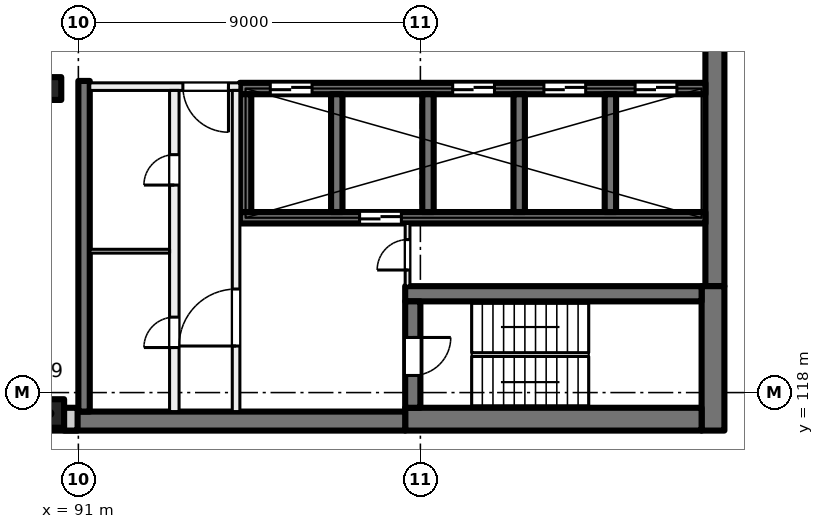
"""IFC4 building model, lengths in metres.
Left out: names, types, materials, properties, quantities, classifications, styles, units other than length and angle.
Written with IfcOpenShell. Run it as: python <this file> out.ifc"""

import sys

from ifc_helpers import new_model, si_unit, direction, frame, frame_2d, origin, origin_2d, place, context, subcontext, project, spatial, rectangle, extrude, element, fill, save


model = new_model("IFC4")
c1 = context("Model", 3, precision=1e-05, world=origin(), true_north=direction((0.0, 1.0)))
c2 = subcontext(c1, "Body", "Model", "MODEL_VIEW")
j1 = project(units=[si_unit("LENGTHUNIT", "METRE"), si_unit("PLANEANGLEUNIT", "RADIAN")], contexts=[c1])
p1 = place(None, origin())
s1 = spatial("IfcSite", under=j1, at=p1, CompositionType="ELEMENT")
p2 = place(p1, origin())
s2 = spatial("IfcBuilding", under=s1, at=p2, CompositionType="ELEMENT")
p3 = place(p2, frame((0.0, 0.0, 224.0)))
s3 = spatial("IfcBuildingStorey", under=s2, at=p3, CompositionType="ELEMENT", Elevation=224.0)
p4 = place(p3, frame((90.25, 126.0, 0.0), z_axis=(0.0, 0.0, 1.0), x_axis=(1.0, 0.0, 0.0)))
e1 = element("IfcColumn", 1, at=p4, inside=s3, PredefinedType="COLUMN", context=c2, shape_type="SweptSolid", body=[
    extrude(rectangle(XDim=0.6, YDim=0.6, at=origin_2d()), origin(), (0.0, 0.0, 1.0), 4.0),
])
p5 = place(p3, frame((90.25, 117.45, 0.0), z_axis=(0.0, 0.0, 1.0), x_axis=(1.0, 0.0, 0.0)))
e2 = element("IfcColumn", 2, at=p5, inside=s3, PredefinedType="COLUMN", context=c2, shape_type="SweptSolid", body=[
    extrude(rectangle(XDim=0.75, YDim=0.75, at=origin_2d()), origin(), (0.0, 0.0, 1.0), 4.0),
])
p6 = place(p3, frame((107.75, 135.2, 0.0), z_axis=(0.0, 0.0, 1.0), x_axis=(0.0, -1.0, 0.0)))
e3 = element("IfcWall", 3, at=p6, inside=s3, PredefinedType="SHEAR", context=c2, shape_type="SweptSolid", body=[
    extrude(rectangle(XDim=14.4, YDim=0.5, at=frame_2d((7.2, 0.0))), origin(), (0.0, 0.0, 1.0), 4.0),
])
p7 = place(p3, frame((107.7, 120.8, 0.0), z_axis=(0.0, 0.0, 1.0), x_axis=(0.0, -1.0, 0.0)))
e4 = element("IfcWall", 4, at=p7, inside=s3, PredefinedType="SHEAR", context=c2, shape_type="SweptSolid", body=[
    extrude(rectangle(XDim=3.8, YDim=0.6, at=frame_2d((1.9, 0.0))), origin(), (0.0, 0.0, 1.0), 4.0),
])
p8 = place(p3, frame((107.4, 117.3, 0.0), z_axis=(0.0, 0.0, 1.0), x_axis=(-1.0, 0.0, 0.0)))
e5 = element("IfcWall", 5, at=p8, inside=s3, PredefinedType="SHEAR", context=c2, shape_type="SweptSolid", body=[
    extrude(rectangle(XDim=7.8, YDim=0.6, at=frame_2d((3.9, 0.0))), origin(), (0.0, 0.0, 1.0), 4.0),
])
p9 = place(p3, frame((99.6, 117.25, 0.0), z_axis=(0.0, 0.0, 1.0), x_axis=(-1.0, 0.0, 0.0)))
e6 = element("IfcWall", 6, at=p9, inside=s3, PredefinedType="SHEAR", context=c2, shape_type="SweptSolid", body=[
    extrude(rectangle(XDim=8.975, YDim=0.5, at=frame_2d((4.488, 0.0))), origin(), (0.0, 0.0, 1.0), 4.0),
])
p10 = place(p3, frame((107.4, 120.6, 0.0), z_axis=(0.0, 0.0, 1.0), x_axis=(-1.0, 0.0, 0.0)))
e7 = element("IfcWall", 7, at=p10, inside=s3, PredefinedType="SHEAR", context=c2, shape_type="SweptSolid", body=[
    extrude(rectangle(XDim=7.8, YDim=0.4, at=frame_2d((3.9, 0.0))), origin(), (0.0, 0.0, 1.0), 4.0),
])
p11 = place(p3, frame((99.8, 120.4, 0.0), z_axis=(0.0, 0.0, 1.0), x_axis=(0.0, -1.0, 0.0)))
e8 = element("IfcWall", 8, at=p11, inside=s3, PredefinedType="SHEAR", context=c2, shape_type="SweptSolid", body=[
    extrude(rectangle(XDim=2.8, YDim=0.4, at=frame_2d((1.4, 0.0))), origin(), (0.0, 0.0, 1.0), 4.0),
])
p12 = place(p11, frame((0.95, 0.0, 0.0)))
e9 = element("IfcOpeningElement", 9, at=p12, cuts=e8, PredefinedType="OPENING", context=c2, shape_type="SweptSolid", body=[
    extrude(rectangle(XDim=1.0, YDim=2.1, at=frame_2d((0.5, 1.05))), frame((0.0, 0.21, 0.0), z_axis=(0.0, -1.0, 0.0), x_axis=(1.0, 0.0, 0.0)), (0.0, 0.0, 1.0), 0.42),
])
p13 = place(p3, frame((107.5, 126.0, 0.0), z_axis=(0.0, 0.0, 1.0), x_axis=(-1.0, 0.0, 0.0)))
e10 = element("IfcWall", 10, at=p13, inside=s3, PredefinedType="SHEAR", context=c2, shape_type="SweptSolid", body=[
    extrude(rectangle(XDim=12.25, YDim=0.3, at=frame_2d((6.125, 0.0))), origin(), (0.0, 0.0, 1.0), 4.0),
])
p14 = place(p13, frame((0.75, 0.0, 0.0)))
e11 = element("IfcOpeningElement", 11, at=p14, cuts=e10, PredefinedType="OPENING", context=c2, shape_type="SweptSolid", body=[
    extrude(rectangle(XDim=1.1, YDim=2.1, at=frame_2d((0.55, 1.05))), frame((0.0, 0.16, 0.0), z_axis=(0.0, -1.0, 0.0), x_axis=(1.0, 0.0, 0.0)), (0.0, 0.0, 1.0), 0.32),
])
p15 = place(p13, frame((3.15, 0.0, 0.0)))
e12 = element("IfcOpeningElement", 12, at=p15, cuts=e10, PredefinedType="OPENING", context=c2, shape_type="SweptSolid", body=[
    extrude(rectangle(XDim=1.1, YDim=2.1, at=frame_2d((0.55, 1.05))), frame((0.0, 0.16, 0.0), z_axis=(0.0, -1.0, 0.0), x_axis=(1.0, 0.0, 0.0)), (0.0, 0.0, 1.0), 0.32),
])
p16 = place(p13, frame((5.55, 0.0, 0.0)))
e13 = element("IfcOpeningElement", 13, at=p16, cuts=e10, PredefinedType="OPENING", context=c2, shape_type="SweptSolid", body=[
    extrude(rectangle(XDim=1.1, YDim=2.1, at=frame_2d((0.55, 1.05))), frame((0.0, 0.16, 0.0), z_axis=(0.0, -1.0, 0.0), x_axis=(1.0, 0.0, 0.0)), (0.0, 0.0, 1.0), 0.32),
])
p17 = place(p13, frame((10.35, 0.0, 0.0)))
e14 = element("IfcOpeningElement", 14, at=p17, cuts=e10, PredefinedType="OPENING", context=c2, shape_type="SweptSolid", body=[
    extrude(rectangle(XDim=1.1, YDim=2.1, at=frame_2d((0.55, 1.05))), frame((0.0, 0.16, 0.0), z_axis=(0.0, -1.0, 0.0), x_axis=(1.0, 0.0, 0.0)), (0.0, 0.0, 1.0), 0.32),
])
p18 = place(p3, frame((107.5, 122.6, 0.0), z_axis=(0.0, 0.0, 1.0), x_axis=(-1.0, 0.0, 0.0)))
e15 = element("IfcWall", 15, at=p18, inside=s3, PredefinedType="SHEAR", context=c2, shape_type="SweptSolid", body=[
    extrude(rectangle(XDim=12.25, YDim=0.3, at=frame_2d((6.125, 0.0))), origin(), (0.0, 0.0, 1.0), 4.0),
])
p19 = place(p18, frame((8.0, 0.0, 0.0)))
e16 = element("IfcOpeningElement", 16, at=p19, cuts=e15, PredefinedType="OPENING", context=c2, shape_type="SweptSolid", body=[
    extrude(rectangle(XDim=1.1, YDim=2.1, at=frame_2d((0.55, 1.05))), frame((0.0, 0.16, 0.0), z_axis=(0.0, -1.0, 0.0), x_axis=(1.0, 0.0, 0.0)), (0.0, 0.0, 1.0), 0.32),
])
for number, where, z_axis, x_axis in (
    (17, (105.0, 125.85, 0.0), (0.0, 0.0, 1.0), (0.0, -1.0, 0.0)),
    (18, (102.6, 125.85, 0.0), (0.0, 0.0, 1.0), (0.0, -1.0, 0.0)),
    (19, (100.2, 125.85, 0.0), (0.0, 0.0, 1.0), (0.0, -1.0, 0.0)),
    (20, (97.8, 125.85, 0.0), (0.0, 0.0, 1.0), (0.0, -1.0, 0.0)),
    (21, (95.4, 125.85, 0.0), (0.0, 0.0, 1.0), (0.0, -1.0, 0.0)),
):
    element("IfcWall", number, at=place(p3, frame(where, z_axis=z_axis, x_axis=x_axis)), inside=s3, PredefinedType="SHEAR", context=c2, shape_type="SweptSolid", body=[
        extrude(rectangle(XDim=3.1, YDim=0.3, at=frame_2d((1.55, 0.0))), origin(), (0.0, 0.0, 1.0), 4.0),
    ])
p20 = place(p3, frame((91.15, 126.2, 0.0), z_axis=(0.0, 0.0, 1.0), x_axis=(0.0, -1.0, 0.0)))
e22 = element("IfcWall", 22, at=p20, inside=s3, PredefinedType="SHEAR", context=c2, shape_type="SweptSolid", body=[
    extrude(rectangle(XDim=8.7, YDim=0.3, at=frame_2d((4.35, 0.0))), origin(), (0.0, 0.0, 1.0), 4.0),
])
p21 = place(p3, frame((90.98, 117.3, 0.0), z_axis=(0.0, 0.0, 1.0), x_axis=(-1.0, 0.0, 0.0)))
e23 = element("IfcWall", 23, at=p21, inside=s3, PredefinedType="SOLIDWALL", context=c2, shape_type="SweptSolid", body=[
    extrude(rectangle(XDim=33.745, YDim=0.6, at=frame_2d((16.873, 0.0))), origin(), (0.0, 0.0, 1.0), 3.625),
])
p22 = place(p21, frame((1.48, 0.0, 0.9)))
e24 = element("IfcOpeningElement", 24, at=p22, cuts=e23, PredefinedType="OPENING", context=c2, shape_type="SweptSolid", body=[
    extrude(rectangle(XDim=3.0, YDim=2.4, at=frame_2d((1.5, 1.2))), frame((0.0, 0.31, 0.0), z_axis=(0.0, -1.0, 0.0), x_axis=(1.0, 0.0, 0.0)), (0.0, 0.0, 1.0), 0.62),
])
p23 = place(p21, frame((5.98, 0.0, 0.9)))
e25 = element("IfcOpeningElement", 25, at=p23, cuts=e23, PredefinedType="OPENING", context=c2, shape_type="SweptSolid", body=[
    extrude(rectangle(XDim=3.0, YDim=2.4, at=frame_2d((1.5, 1.2))), frame((0.0, 0.31, 0.0), z_axis=(0.0, -1.0, 0.0), x_axis=(1.0, 0.0, 0.0)), (0.0, 0.0, 1.0), 0.62),
])
p24 = place(p21, frame((10.48, 0.0, 0.9)))
e26 = element("IfcOpeningElement", 26, at=p24, cuts=e23, PredefinedType="OPENING", context=c2, shape_type="SweptSolid", body=[
    extrude(rectangle(XDim=3.0, YDim=2.4, at=frame_2d((1.5, 1.2))), frame((0.0, 0.31, 0.0), z_axis=(0.0, -1.0, 0.0), x_axis=(1.0, 0.0, 0.0)), (0.0, 0.0, 1.0), 0.62),
])
p25 = place(p21, frame((14.98, 0.0, 0.9)))
e27 = element("IfcOpeningElement", 27, at=p25, cuts=e23, PredefinedType="OPENING", context=c2, shape_type="SweptSolid", body=[
    extrude(rectangle(XDim=3.0, YDim=2.4, at=frame_2d((1.5, 1.2))), frame((0.0, 0.31, 0.0), z_axis=(0.0, -1.0, 0.0), x_axis=(1.0, 0.0, 0.0)), (0.0, 0.0, 1.0), 0.62),
])
p26 = place(p21, frame((19.48, 0.0, 0.9)))
e28 = element("IfcOpeningElement", 28, at=p26, cuts=e23, PredefinedType="OPENING", context=c2, shape_type="SweptSolid", body=[
    extrude(rectangle(XDim=3.0, YDim=2.4, at=frame_2d((1.5, 1.2))), frame((0.0, 0.31, 0.0), z_axis=(0.0, -1.0, 0.0), x_axis=(1.0, 0.0, 0.0)), (0.0, 0.0, 1.0), 0.62),
])
p27 = place(p21, frame((23.98, 0.0, 0.9)))
e29 = element("IfcOpeningElement", 29, at=p27, cuts=e23, PredefinedType="OPENING", context=c2, shape_type="SweptSolid", body=[
    extrude(rectangle(XDim=3.0, YDim=2.4, at=frame_2d((1.5, 1.2))), frame((0.0, 0.31, 0.0), z_axis=(0.0, -1.0, 0.0), x_axis=(1.0, 0.0, 0.0)), (0.0, 0.0, 1.0), 0.62),
])
p28 = place(p21, frame((28.48, 0.0, 0.9)))
e30 = element("IfcOpeningElement", 30, at=p28, cuts=e23, PredefinedType="OPENING", context=c2, shape_type="SweptSolid", body=[
    extrude(rectangle(XDim=3.0, YDim=2.4, at=frame_2d((1.5, 1.2))), frame((0.0, 0.31, 0.0), z_axis=(0.0, -1.0, 0.0), x_axis=(1.0, 0.0, 0.0)), (0.0, 0.0, 1.0), 0.62),
])
p29 = place(p3, frame((95.25, 126.05, 0.0), z_axis=(0.0, 0.0, 1.0), x_axis=(-1.0, 0.0, 0.0)))
e31 = element("IfcWall", 31, at=p29, inside=s3, PredefinedType="PARTITIONING", context=c2, shape_type="SweptSolid", body=[
    extrude(rectangle(XDim=3.95, YDim=0.2, at=frame_2d((1.975, 0.0))), origin(), (0.0, 0.0, 1.0), 3.625),
])
p30 = place(p29, frame((0.3, 0.0, 0.0)))
e32 = element("IfcOpeningElement", 32, at=p30, cuts=e31, PredefinedType="OPENING", context=c2, shape_type="SweptSolid", body=[
    extrude(rectangle(XDim=1.2, YDim=2.1, at=frame_2d((0.6, 1.05))), frame((0.0, 0.11, 0.0), z_axis=(0.0, -1.0, 0.0), x_axis=(1.0, 0.0, 0.0)), (0.0, 0.0, 1.0), 0.22),
])
p31 = place(p3, frame((95.15, 117.5, 0.0), z_axis=(0.0, 0.0, 1.0), x_axis=(0.0, 1.0, 0.0)))
e33 = element("IfcWall", 33, at=p31, inside=s3, PredefinedType="PARTITIONING", context=c2, shape_type="SweptSolid", body=[
    extrude(rectangle(XDim=8.45, YDim=0.2, at=frame_2d((4.225, 0.0))), origin(), (0.0, 0.0, 1.0), 3.625),
])
p32 = place(p31, frame((1.725, 0.0, 0.0)))
e34 = element("IfcOpeningElement", 34, at=p32, cuts=e33, PredefinedType="OPENING", context=c2, shape_type="SweptSolid", body=[
    extrude(rectangle(XDim=1.5, YDim=2.1, at=frame_2d((0.75, 1.05))), frame((0.0, 0.11, 0.0), z_axis=(0.0, -1.0, 0.0), x_axis=(1.0, 0.0, 0.0)), (0.0, 0.0, 1.0), 0.22),
])
p33 = place(p3, frame((93.525, 117.5, 0.0), z_axis=(0.0, 0.0, 1.0), x_axis=(0.0, 1.0, 0.0)))
e35 = element("IfcWall", 35, at=p33, inside=s3, PredefinedType="PARTITIONING", context=c2, shape_type="SweptSolid", body=[
    extrude(rectangle(XDim=8.45, YDim=0.25, at=frame_2d((4.225, 0.0))), origin(), (0.0, 0.0, 1.0), 3.625),
])
p34 = place(p33, frame((5.96, 0.0, 0.0)))
e36 = element("IfcOpeningElement", 36, at=p34, cuts=e35, PredefinedType="OPENING", context=c2, shape_type="SweptSolid", body=[
    extrude(rectangle(XDim=0.8, YDim=2.1, at=frame_2d((0.4, 1.05))), frame((0.0, 0.135, 0.0), z_axis=(0.0, -1.0, 0.0), x_axis=(1.0, 0.0, 0.0)), (0.0, 0.0, 1.0), 0.27),
])
p35 = place(p33, frame((1.685, 0.0, 0.0)))
e37 = element("IfcOpeningElement", 37, at=p35, cuts=e35, PredefinedType="OPENING", context=c2, shape_type="SweptSolid", body=[
    extrude(rectangle(XDim=0.8, YDim=2.1, at=frame_2d((0.4, 1.05))), frame((0.0, 0.135, 0.0), z_axis=(0.0, -1.0, 0.0), x_axis=(1.0, 0.0, 0.0)), (0.0, 0.0, 1.0), 0.27),
])
p36 = place(p3, frame((99.663, 120.8, 0.0), z_axis=(0.0, 0.0, 1.0), x_axis=(0.0, 1.0, 0.0)))
e38 = element("IfcWall", 38, at=p36, inside=s3, PredefinedType="PARTITIONING", context=c2, shape_type="SweptSolid", body=[
    extrude(rectangle(XDim=1.65, YDim=0.125, at=frame_2d((0.825, 0.0))), origin(), (0.0, 0.0, 1.0), 3.625),
])
p37 = place(p36, frame((0.425, 0.0, 0.0)))
e39 = element("IfcOpeningElement", 39, at=p37, cuts=e38, PredefinedType="OPENING", context=c2, shape_type="SweptSolid", body=[
    extrude(rectangle(XDim=0.8, YDim=2.1, at=frame_2d((0.4, 1.05))), frame((0.0, 0.073, 0.0), z_axis=(0.0, -1.0, 0.0), x_axis=(1.0, 0.0, 0.0)), (0.0, 0.0, 1.0), 0.145),
])
p38 = place(p3, frame((93.4, 121.72, 0.0), z_axis=(0.0, 0.0, 1.0), x_axis=(-1.0, 0.0, 0.0)))
e40 = element("IfcWall", 40, at=p38, inside=s3, PredefinedType="PARTITIONING", context=c2, shape_type="SweptSolid", body=[
    extrude(rectangle(XDim=2.1, YDim=0.1, at=frame_2d((1.05, 0.0))), origin(), (0.0, 0.0, 1.0), 3.625),
])
p39 = place(p14, origin())
e41 = element("IfcDoor", 41, at=p39, inside=s3, OperationType="DOUBLE_DOOR_SLIDING", PredefinedType="DOOR", context=c2, shape_type="SweptSolid", body=[
    extrude(rectangle(XDim=1.1, YDim=2.1, at=frame_2d((0.55, 1.05))), frame((0.0, 0.025, 0.0), z_axis=(0.0, -1.0, 0.0), x_axis=(1.0, 0.0, 0.0)), (0.0, 0.0, 1.0), 0.05),
])
fill(e11, e41)
p40 = place(p15, origin())
e42 = element("IfcDoor", 42, at=p40, inside=s3, OperationType="DOUBLE_DOOR_SLIDING", PredefinedType="DOOR", context=c2, shape_type="SweptSolid", body=[
    extrude(rectangle(XDim=1.1, YDim=2.1, at=frame_2d((0.55, 1.05))), frame((0.0, 0.025, 0.0), z_axis=(0.0, -1.0, 0.0), x_axis=(1.0, 0.0, 0.0)), (0.0, 0.0, 1.0), 0.05),
])
fill(e12, e42)
p41 = place(p16, origin())
e43 = element("IfcDoor", 43, at=p41, inside=s3, OperationType="DOUBLE_DOOR_SLIDING", PredefinedType="DOOR", context=c2, shape_type="SweptSolid", body=[
    extrude(rectangle(XDim=1.1, YDim=2.1, at=frame_2d((0.55, 1.05))), frame((0.0, 0.025, 0.0), z_axis=(0.0, -1.0, 0.0), x_axis=(1.0, 0.0, 0.0)), (0.0, 0.0, 1.0), 0.05),
])
fill(e13, e43)
p42 = place(p17, origin())
e44 = element("IfcDoor", 44, at=p42, inside=s3, OperationType="DOUBLE_DOOR_SLIDING", PredefinedType="DOOR", context=c2, shape_type="SweptSolid", body=[
    extrude(rectangle(XDim=1.1, YDim=2.1, at=frame_2d((0.55, 1.05))), frame((0.0, 0.025, 0.0), z_axis=(0.0, -1.0, 0.0), x_axis=(1.0, 0.0, 0.0)), (0.0, 0.0, 1.0), 0.05),
])
fill(e14, e44)
p43 = place(p30, origin())
e45 = element("IfcDoor", 45, at=p43, inside=s3, OperationType="DOUBLE_DOOR_SINGLE_SWING", PredefinedType="DOOR", context=c2, shape_type="SweptSolid", body=[
    extrude(rectangle(XDim=1.2, YDim=2.1, at=frame_2d((0.6, 1.05))), frame((0.0, 0.025, 0.0), z_axis=(0.0, -1.0, 0.0), x_axis=(1.0, 0.0, 0.0)), (0.0, 0.0, 1.0), 0.05),
])
fill(e32, e45)
p44 = place(p32, origin())
e46 = element("IfcDoor", 46, at=p44, inside=s3, OperationType="DOUBLE_DOOR_SINGLE_SWING", PredefinedType="DOOR", context=c2, shape_type="SweptSolid", body=[
    extrude(rectangle(XDim=1.5, YDim=2.1, at=frame_2d((0.75, 1.05))), frame((0.0, 0.025, 0.0), z_axis=(0.0, -1.0, 0.0), x_axis=(1.0, 0.0, 0.0)), (0.0, 0.0, 1.0), 0.05),
])
fill(e34, e46)
p45 = place(p12, origin())
e47 = element("IfcDoor", 47, at=p45, inside=s3, OperationType="SINGLE_SWING_LEFT", PredefinedType="DOOR", context=c2, shape_type="SweptSolid", body=[
    extrude(rectangle(XDim=1.0, YDim=2.1, at=frame_2d((0.5, 1.05))), frame((0.0, 0.025, 0.0), z_axis=(0.0, -1.0, 0.0), x_axis=(1.0, 0.0, 0.0)), (0.0, 0.0, 1.0), 0.05),
])
fill(e9, e47)
p46 = place(p37, origin())
e48 = element("IfcDoor", 48, at=p46, inside=s3, OperationType="SINGLE_SWING_RIGHT", PredefinedType="DOOR", context=c2, shape_type="SweptSolid", body=[
    extrude(rectangle(XDim=0.8, YDim=2.1, at=frame_2d((0.4, 1.05))), frame((0.0, 0.025, 0.0), z_axis=(0.0, -1.0, 0.0), x_axis=(1.0, 0.0, 0.0)), (0.0, 0.0, 1.0), 0.05),
])
fill(e39, e48)
p47 = place(p34, origin())
e49 = element("IfcDoor", 49, at=p47, inside=s3, OperationType="SINGLE_SWING_LEFT", PredefinedType="DOOR", context=c2, shape_type="SweptSolid", body=[
    extrude(rectangle(XDim=0.8, YDim=2.1, at=frame_2d((0.4, 1.05))), frame((0.0, 0.025, 0.0), z_axis=(0.0, -1.0, 0.0), x_axis=(1.0, 0.0, 0.0)), (0.0, 0.0, 1.0), 0.05),
])
fill(e36, e49)
p48 = place(p35, origin())
e50 = element("IfcDoor", 50, at=p48, inside=s3, OperationType="SINGLE_SWING_RIGHT", PredefinedType="DOOR", context=c2, shape_type="SweptSolid", body=[
    extrude(rectangle(XDim=0.8, YDim=2.1, at=frame_2d((0.4, 1.05))), frame((0.0, 0.025, 0.0), z_axis=(0.0, -1.0, 0.0), x_axis=(1.0, 0.0, 0.0)), (0.0, 0.0, 1.0), 0.05),
])
fill(e37, e50)
p49 = place(p19, origin())
e51 = element("IfcDoor", 51, at=p49, inside=s3, OperationType="DOUBLE_DOOR_SLIDING", PredefinedType="DOOR", context=c2, shape_type="SweptSolid", body=[
    extrude(rectangle(XDim=1.1, YDim=2.1, at=frame_2d((0.55, 1.05))), frame((0.0, 0.025, 0.0), z_axis=(0.0, -1.0, 0.0), x_axis=(1.0, 0.0, 0.0)), (0.0, 0.0, 1.0), 0.05),
])
fill(e16, e51)
save(model, sys.argv[1])
